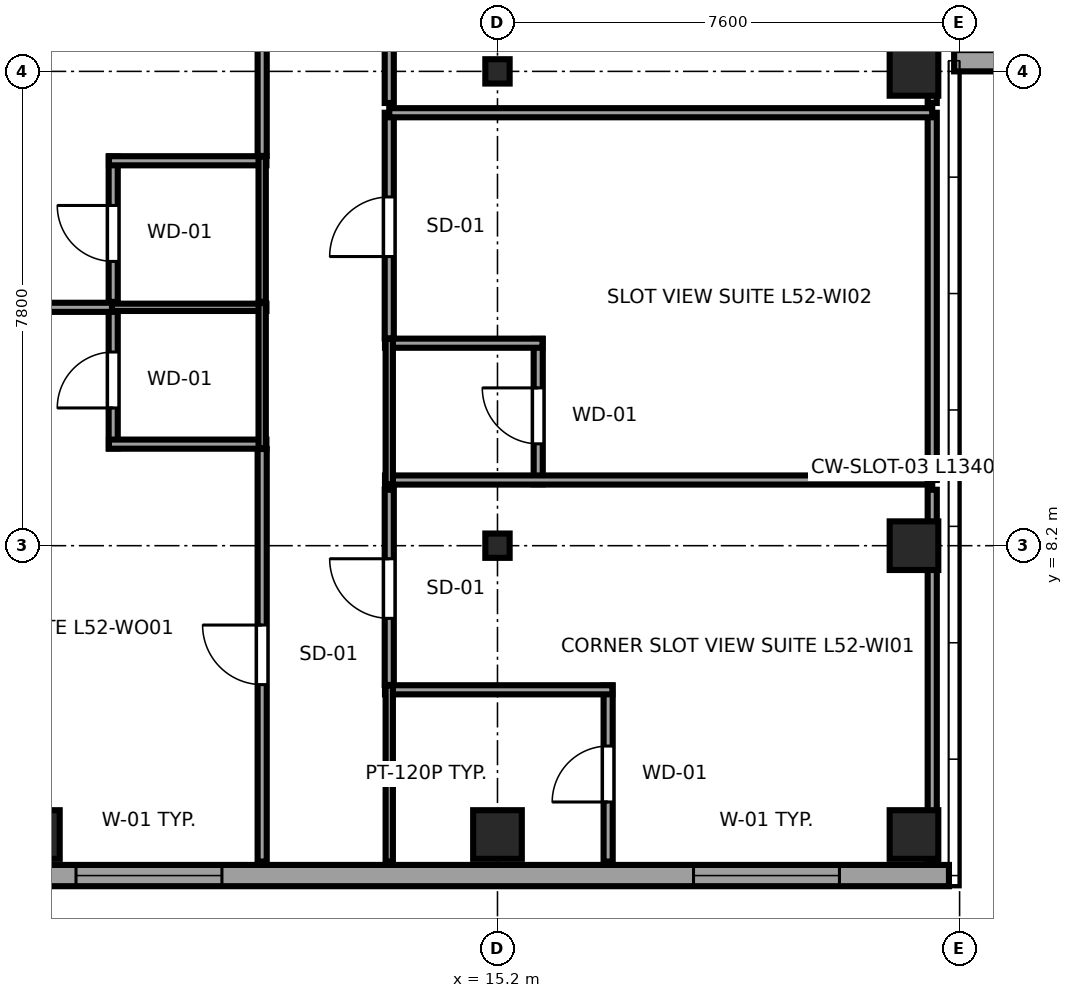
"""IFC4 building model, lengths in metres.
Left out: names, types, materials, properties, quantities, classifications, styles, units other than length and angle.
Written with IfcOpenShell. Run it as: python <this file> out.ifc"""

import sys

from ifc_helpers import new_model, si_unit, direction, frame, frame_2d, origin, origin_2d, place, context, subcontext, project, spatial, rectangle, i_section, extrude, source, transform, mapped, element, fill, save


model = new_model("IFC4")
c1 = context("Model", 3, precision=1e-05, world=origin(), true_north=direction((0.0, 1.0)))
c2 = subcontext(c1, "Body", "Model", "MODEL_VIEW")
j1 = project(units=[si_unit("LENGTHUNIT", "METRE"), si_unit("PLANEANGLEUNIT", "RADIAN")], contexts=[c1])
p1 = place(None, origin())
s1 = spatial("IfcSite", under=j1, at=p1, CompositionType="ELEMENT")
p2 = place(p1, origin())
s2 = spatial("IfcBuilding", under=s1, at=p2, CompositionType="ELEMENT")
p3 = place(p2, frame((0.0, 0.0, 198.2)))
s3 = spatial("IfcBuildingStorey", under=s2, at=p3, CompositionType="ELEMENT", Elevation=198.2)
m1 = source(origin(), c2, "Body", "SweptSolid", [
    extrude(rectangle(XDim=0.8, YDim=0.8, at=origin_2d()), origin(), (0.0, 0.0, 1.0), 3.55),
])
for number, where, z_axis, x_axis in (
    (1, (7.6, 3.45, 0.0), (0.0, 0.0, 1.0), (1.0, 0.0, 0.0)),
    (2, (15.2, 3.45, 0.0), (0.0, 0.0, 1.0), (1.0, 0.0, 0.0)),
):
    element("IfcColumn", number, at=place(p3, frame(where, z_axis=z_axis, x_axis=x_axis)), inside=s3, PredefinedType="COLUMN", context=c2, shape_type="MappedRepresentation", body=[
        mapped(m1, transform((0.0, 0.0, 0.0), x_axis=(1.0, 0.0, 0.0), y_axis=(0.0, 1.0, 0.0), z_axis=(0.0, 0.0, 1.0), scale=1.0)),
    ])
m2 = source(origin(), c2, "Body", "SweptSolid", [
    extrude(i_section(OverallWidth=0.4, OverallDepth=0.4, WebThickness=0.02, FlangeThickness=0.035, at=origin_2d()), origin(), (0.0, 0.0, 1.0), 3.55),
])
for number, where, z_axis, x_axis in (
    (3, (15.2, 8.2, 0.0), (0.0, 0.0, 1.0), (1.0, 0.0, 0.0)),
    (4, (15.2, 16.0, 0.0), (0.0, 0.0, 1.0), (1.0, 0.0, 0.0)),
):
    element("IfcColumn", number, at=place(p3, frame(where, z_axis=z_axis, x_axis=x_axis)), inside=s3, PredefinedType="COLUMN", context=c2, shape_type="MappedRepresentation", body=[
        mapped(m2, transform((0.0, 0.0, 0.0), x_axis=(1.0, 0.0, 0.0), y_axis=(0.0, 1.0, 0.0), z_axis=(0.0, 0.0, 1.0), scale=1.0)),
    ])
for number, where, z_axis, x_axis in (
    (5, (22.05, 3.45, 0.0), (0.0, 0.0, 1.0), (1.0, 0.0, 0.0)),
    (6, (22.05, 8.2, 0.0), (0.0, 0.0, 1.0), (1.0, 0.0, 0.0)),
    (7, (22.05, 16.0, 0.0), (0.0, 0.0, 1.0), (1.0, 0.0, 0.0)),
):
    element("IfcColumn", number, at=place(p3, frame(where, z_axis=z_axis, x_axis=x_axis)), inside=s3, PredefinedType="COLUMN", context=c2, shape_type="MappedRepresentation", body=[
        mapped(m1, transform((0.0, 0.0, 0.0), x_axis=(1.0, 0.0, 0.0), y_axis=(0.0, 1.0, 0.0), z_axis=(0.0, 0.0, 1.0), scale=1.0)),
    ])
p4 = place(p3, frame((7.017, 2.775, 0.0), z_axis=(0.0, 0.0, 1.0), x_axis=(1.0, 0.0, 0.0)))
e8 = element("IfcWall", 8, at=p4, inside=s3, PredefinedType="SOLIDWALL", context=c2, shape_type="SweptSolid", body=[
    extrude(rectangle(XDim=15.608, YDim=0.35, at=frame_2d((7.804, 0.0))), origin(), (0.0, 0.0, 1.0), 3.37),
])
p5 = place(p4, frame((1.251, 0.0, 0.68)))
e9 = element("IfcOpeningElement", 9, at=p5, cuts=e8, PredefinedType="OPENING", context=c2, shape_type="SweptSolid", body=[
    extrude(rectangle(XDim=2.4, YDim=1.9, at=frame_2d((1.2, 0.95))), frame((0.0, 0.185, 0.0), z_axis=(0.0, -1.0, 0.0), x_axis=(1.0, 0.0, 0.0)), (0.0, 0.0, 1.0), 0.37),
])
p6 = place(p4, frame((11.407, 0.0, 0.68)))
e10 = element("IfcOpeningElement", 10, at=p6, cuts=e8, PredefinedType="OPENING", context=c2, shape_type="SweptSolid", body=[
    extrude(rectangle(XDim=2.4, YDim=1.9, at=frame_2d((1.2, 0.95))), frame((0.0, 0.185, 0.0), z_axis=(0.0, -1.0, 0.0), x_axis=(1.0, 0.0, 0.0)), (0.0, 0.0, 1.0), 0.37),
])
p7 = place(p3, frame((22.71, 16.175, 0.0), z_axis=(0.0, 0.0, 1.0), x_axis=(1.0, 0.0, 0.0)))
e11 = element("IfcWall", 11, at=p7, inside=s3, PredefinedType="SOLIDWALL", context=c2, shape_type="SweptSolid", body=[
    extrude(rectangle(XDim=11.58, YDim=0.35, at=frame_2d((5.79, 0.0))), origin(), (0.0, 0.0, 1.0), 2.758),
])
p8 = place(p7, frame((1.995, 0.0, 0.68)))
e12 = element("IfcOpeningElement", 12, at=p8, cuts=e11, PredefinedType="OPENING", context=c2, shape_type="SweptSolid", body=[
    extrude(rectangle(XDim=2.4, YDim=1.9, at=frame_2d((1.2, 0.95))), frame((0.0, 0.185, 0.0), z_axis=(0.0, -1.0, 0.0), x_axis=(1.0, 0.0, 0.0)), (0.0, 0.0, 1.0), 0.37),
])
p9 = place(p7, frame((7.185, 0.0, 0.68)))
e13 = element("IfcOpeningElement", 13, at=p9, cuts=e11, PredefinedType="OPENING", context=c2, shape_type="SweptSolid", body=[
    extrude(rectangle(XDim=2.4, YDim=1.9, at=frame_2d((1.2, 0.95))), frame((0.0, 0.185, 0.0), z_axis=(0.0, -1.0, 0.0), x_axis=(1.0, 0.0, 0.0)), (0.0, 0.0, 1.0), 0.37),
])
p10 = place(p3, frame((8.88, 9.8, 0.0), z_axis=(0.0, 0.0, 1.0), x_axis=(0.0, 1.0, 0.0)))
e14 = element("IfcWall", 14, at=p10, inside=s3, PredefinedType="PARTITIONING", context=c2, shape_type="SweptSolid", body=[
    extrude(rectangle(XDim=2.39, YDim=0.15, at=frame_2d((1.195, 0.0))), origin(), (0.0, 0.0, 1.0), 3.37),
])
p11 = place(p10, frame((0.665, 0.0, 0.0)))
e15 = element("IfcOpeningElement", 15, at=p11, cuts=e14, PredefinedType="OPENING", context=c2, shape_type="SweptSolid", body=[
    extrude(rectangle(XDim=0.92, YDim=2.01, at=frame_2d((0.46, 1.005))), frame((0.0, 0.085, 0.0), z_axis=(0.0, -1.0, 0.0), x_axis=(1.0, 0.0, 0.0)), (0.0, 0.0, 1.0), 0.17),
])
p12 = place(p3, frame((8.81, 9.87, 0.0), z_axis=(0.0, 0.0, 1.0), x_axis=(1.0, 0.0, 0.0)))
e16 = element("IfcWall", 16, at=p12, inside=s3, PredefinedType="PARTITIONING", context=c2, shape_type="SweptSolid", body=[
    extrude(rectangle(XDim=2.59, YDim=0.15, at=frame_2d((1.295, 0.0))), origin(), (0.0, 0.0, 1.0), 3.37),
])
p13 = place(p3, frame((8.81, 12.12, 0.0), z_axis=(0.0, 0.0, 1.0), x_axis=(1.0, 0.0, 0.0)))
e17 = element("IfcWall", 17, at=p13, inside=s3, PredefinedType="PLUMBINGWALL", context=c2, shape_type="SweptSolid", body=[
    extrude(rectangle(XDim=2.59, YDim=0.12, at=frame_2d((1.295, 0.0))), origin(), (0.0, 0.0, 1.0), 3.37),
])
p14 = place(p3, frame((11.33, 9.8, 0.0), z_axis=(0.0, 0.0, 1.0), x_axis=(0.0, 1.0, 0.0)))
e18 = element("IfcWall", 18, at=p14, inside=s3, PredefinedType="PLUMBINGWALL", context=c2, shape_type="SweptSolid", body=[
    extrude(rectangle(XDim=2.39, YDim=0.12, at=frame_2d((1.195, 0.0))), origin(), (0.0, 0.0, 1.0), 3.001),
])
p15 = place(p3, frame((8.88, 12.21, 0.0), z_axis=(0.0, 0.0, 1.0), x_axis=(0.0, 1.0, 0.0)))
e19 = element("IfcWall", 19, at=p15, inside=s3, PredefinedType="PARTITIONING", context=c2, shape_type="SweptSolid", body=[
    extrude(rectangle(XDim=2.39, YDim=0.15, at=frame_2d((1.195, 0.0))), origin(), (0.0, 0.0, 1.0), 3.37),
])
p16 = place(p15, frame((0.665, 0.0, 0.0)))
e20 = element("IfcOpeningElement", 20, at=p16, cuts=e19, PredefinedType="OPENING", context=c2, shape_type="SweptSolid", body=[
    extrude(rectangle(XDim=0.92, YDim=2.01, at=frame_2d((0.46, 1.005))), frame((0.0, 0.085, 0.0), z_axis=(0.0, -1.0, 0.0), x_axis=(1.0, 0.0, 0.0)), (0.0, 0.0, 1.0), 0.17),
])
p17 = place(p3, frame((8.81, 14.53, 0.0), z_axis=(0.0, 0.0, 1.0), x_axis=(1.0, 0.0, 0.0)))
e21 = element("IfcWall", 21, at=p17, inside=s3, PredefinedType="PARTITIONING", context=c2, shape_type="SweptSolid", body=[
    extrude(rectangle(XDim=2.59, YDim=0.15, at=frame_2d((1.295, 0.0))), origin(), (0.0, 0.0, 1.0), 3.37),
])
p18 = place(p3, frame((11.33, 12.21, 0.0), z_axis=(0.0, 0.0, 1.0), x_axis=(0.0, 1.0, 0.0)))
e22 = element("IfcWall", 22, at=p18, inside=s3, PredefinedType="PLUMBINGWALL", context=c2, shape_type="SweptSolid", body=[
    extrude(rectangle(XDim=2.39, YDim=0.12, at=frame_2d((1.195, 0.0))), origin(), (0.0, 0.0, 1.0), 3.001),
])
p19 = place(p3, frame((17.02, 3.005, 0.0), z_axis=(0.0, 0.0, 1.0), x_axis=(0.0, 1.0, 0.0)))
e23 = element("IfcWall", 23, at=p19, inside=s3, PredefinedType="PARTITIONING", context=c2, shape_type="SweptSolid", body=[
    extrude(rectangle(XDim=2.895, YDim=0.15, at=frame_2d((1.448, 0.0))), origin(), (0.0, 0.0, 1.0), 3.37),
])
p20 = place(p19, frame((0.98, 0.0, 0.0)))
e24 = element("IfcOpeningElement", 24, at=p20, cuts=e23, PredefinedType="OPENING", context=c2, shape_type="SweptSolid", body=[
    extrude(rectangle(XDim=0.92, YDim=2.01, at=frame_2d((0.46, 1.005))), frame((0.0, 0.085, 0.0), z_axis=(0.0, -1.0, 0.0), x_axis=(1.0, 0.0, 0.0)), (0.0, 0.0, 1.0), 0.17),
])
p21 = place(p3, frame((13.35, 5.83, 0.0), z_axis=(0.0, 0.0, 1.0), x_axis=(1.0, 0.0, 0.0)))
e25 = element("IfcWall", 25, at=p21, inside=s3, PredefinedType="PARTITIONING", context=c2, shape_type="SweptSolid", body=[
    extrude(rectangle(XDim=3.74, YDim=0.15, at=frame_2d((1.87, 0.0))), origin(), (0.0, 0.0, 1.0), 3.37),
])
p22 = place(p3, frame((13.42, 3.005, 0.0), z_axis=(0.0, 0.0, 1.0), x_axis=(0.0, 1.0, 0.0)))
e26 = element("IfcWall", 26, at=p22, inside=s3, PredefinedType="PLUMBINGWALL", context=c2, shape_type="SweptSolid", body=[
    extrude(rectangle(XDim=2.895, YDim=0.12, at=frame_2d((1.448, 0.0))), origin(), (0.0, 0.0, 1.0), 3.37),
])
p23 = place(p3, frame((15.87, 9.21, 0.0), z_axis=(0.0, 0.0, 1.0), x_axis=(0.0, 1.0, 0.0)))
e27 = element("IfcWall", 27, at=p23, inside=s3, PredefinedType="PARTITIONING", context=c2, shape_type="SweptSolid", body=[
    extrude(rectangle(XDim=2.39, YDim=0.15, at=frame_2d((1.195, 0.0))), origin(), (0.0, 0.0, 1.0), 3.37),
])
p24 = place(p23, frame((0.665, 0.0, 0.0)))
e28 = element("IfcOpeningElement", 28, at=p24, cuts=e27, PredefinedType="OPENING", context=c2, shape_type="SweptSolid", body=[
    extrude(rectangle(XDim=0.92, YDim=2.01, at=frame_2d((0.46, 1.005))), frame((0.0, 0.085, 0.0), z_axis=(0.0, -1.0, 0.0), x_axis=(1.0, 0.0, 0.0)), (0.0, 0.0, 1.0), 0.17),
])
p25 = place(p3, frame((13.35, 9.28, 0.0), z_axis=(0.0, 0.0, 1.0), x_axis=(1.0, 0.0, 0.0)))
e29 = element("IfcWall", 29, at=p25, inside=s3, PredefinedType="PARTITIONING", context=c2, shape_type="SweptSolid", body=[
    extrude(rectangle(XDim=9.0, YDim=0.15, at=frame_2d((4.5, 0.0))), origin(), (0.0, 0.0, 1.0), 3.37),
])
p26 = place(p3, frame((13.35, 11.53, 0.0), z_axis=(0.0, 0.0, 1.0), x_axis=(1.0, 0.0, 0.0)))
e30 = element("IfcWall", 30, at=p26, inside=s3, PredefinedType="PARTITIONING", context=c2, shape_type="SweptSolid", body=[
    extrude(rectangle(XDim=2.59, YDim=0.15, at=frame_2d((1.295, 0.0))), origin(), (0.0, 0.0, 1.0), 3.37),
])
p27 = place(p3, frame((13.42, 9.21, 0.0), z_axis=(0.0, 0.0, 1.0), x_axis=(0.0, 1.0, 0.0)))
e31 = element("IfcWall", 31, at=p27, inside=s3, PredefinedType="PLUMBINGWALL", context=c2, shape_type="SweptSolid", body=[
    extrude(rectangle(XDim=2.39, YDim=0.12, at=frame_2d((1.195, 0.0))), origin(), (0.0, 0.0, 1.0), 3.37),
])
p28 = place(p3, frame((11.33, 3.005, 0.0), z_axis=(0.0, 0.0, 1.0), x_axis=(0.0, 1.0, 0.0)))
e32 = element("IfcWall", 32, at=p28, inside=s3, PredefinedType="PARTITIONING", context=c2, shape_type="SweptSolid", body=[
    extrude(rectangle(XDim=6.785, YDim=0.15, at=frame_2d((3.393, 0.0))), origin(), (0.0, 0.0, 1.0), 3.001),
])
p29 = place(p28, frame((2.91, 0.0, 0.0)))
e33 = element("IfcOpeningElement", 33, at=p29, cuts=e32, PredefinedType="OPENING", context=c2, shape_type="SweptSolid", body=[
    extrude(rectangle(XDim=0.98, YDim=2.12, at=frame_2d((0.49, 1.06))), frame((0.0, 0.085, 0.0), z_axis=(0.0, -1.0, 0.0), x_axis=(1.0, 0.0, 0.0)), (0.0, 0.0, 1.0), 0.17),
])
p30 = place(p3, frame((2.9, 12.12, 0.0), z_axis=(0.0, 0.0, 1.0), x_axis=(1.0, 0.0, 0.0)))
e34 = element("IfcWall", 34, at=p30, inside=s3, PredefinedType="PARTITIONING", context=c2, shape_type="SweptSolid", body=[
    extrude(rectangle(XDim=5.96, YDim=0.15, at=frame_2d((2.98, 0.0))), origin(), (0.0, 0.0, 1.0), 3.37),
])
p31 = place(p3, frame((11.33, 14.61, 0.0), z_axis=(0.0, 0.0, 1.0), x_axis=(0.0, 1.0, 0.0)))
e35 = element("IfcWall", 35, at=p31, inside=s3, PredefinedType="PARTITIONING", context=c2, shape_type="SweptSolid", body=[
    extrude(rectangle(XDim=6.81, YDim=0.15, at=frame_2d((3.405, 0.0))), origin(), (0.0, 0.0, 1.0), 3.001),
])
p32 = place(p31, frame((2.895, 0.0, 0.0)))
e36 = element("IfcOpeningElement", 36, at=p32, cuts=e35, PredefinedType="OPENING", context=c2, shape_type="SweptSolid", body=[
    extrude(rectangle(XDim=0.98, YDim=2.12, at=frame_2d((0.49, 1.06))), frame((0.0, 0.085, 0.0), z_axis=(0.0, -1.0, 0.0), x_axis=(1.0, 0.0, 0.0)), (0.0, 0.0, 1.0), 0.17),
])
p33 = place(p3, frame((13.42, 5.91, 0.0), z_axis=(0.0, 0.0, 1.0), x_axis=(0.0, 1.0, 0.0)))
e37 = element("IfcWall", 37, at=p33, inside=s3, PredefinedType="PARTITIONING", context=c2, shape_type="SweptSolid", body=[
    extrude(rectangle(XDim=3.21, YDim=0.15, at=frame_2d((1.605, 0.0))), origin(), (0.0, 0.0, 1.0), 3.37),
])
p34 = place(p33, frame((1.095, 0.0, 0.0)))
e38 = element("IfcOpeningElement", 38, at=p34, cuts=e37, PredefinedType="OPENING", context=c2, shape_type="SweptSolid", body=[
    extrude(rectangle(XDim=0.98, YDim=2.12, at=frame_2d((0.49, 1.06))), frame((0.0, 0.085, 0.0), z_axis=(0.0, -1.0, 0.0), x_axis=(1.0, 0.0, 0.0)), (0.0, 0.0, 1.0), 0.17),
])
p35 = place(p3, frame((22.35, 3.005, 0.0), z_axis=(0.0, 0.0, 1.0), x_axis=(0.0, 1.0, 0.0)))
e39 = element("IfcWall", 39, at=p35, inside=s3, PredefinedType="PARTITIONING", context=c2, shape_type="SweptSolid", body=[
    extrude(rectangle(XDim=6.115, YDim=0.15, at=frame_2d((3.058, 0.0))), origin(), (0.0, 0.0, 1.0), 3.37),
])
p36 = place(p3, frame((13.42, 11.61, 0.0), z_axis=(0.0, 0.0, 1.0), x_axis=(0.0, 1.0, 0.0)))
e40 = element("IfcWall", 40, at=p36, inside=s3, PredefinedType="PARTITIONING", context=c2, shape_type="SweptSolid", body=[
    extrude(rectangle(XDim=3.71, YDim=0.15, at=frame_2d((1.855, 0.0))), origin(), (0.0, 0.0, 1.0), 3.37),
])
p37 = place(p36, frame((1.345, 0.0, 0.0)))
e41 = element("IfcOpeningElement", 41, at=p37, cuts=e40, PredefinedType="OPENING", context=c2, shape_type="SweptSolid", body=[
    extrude(rectangle(XDim=0.98, YDim=2.12, at=frame_2d((0.49, 1.06))), frame((0.0, 0.085, 0.0), z_axis=(0.0, -1.0, 0.0), x_axis=(1.0, 0.0, 0.0)), (0.0, 0.0, 1.0), 0.17),
])
p38 = place(p3, frame((22.35, 9.28, 0.0), z_axis=(0.0, 0.0, 1.0), x_axis=(0.0, 1.0, 0.0)))
e42 = element("IfcWall", 42, at=p38, inside=s3, PredefinedType="PARTITIONING", context=c2, shape_type="SweptSolid", body=[
    extrude(rectangle(XDim=6.04, YDim=0.15, at=frame_2d((3.02, 0.0))), origin(), (0.0, 0.0, 1.0), 3.37),
])
p39 = place(p3, frame((13.42, 15.32, 0.0), z_axis=(0.0, 0.0, 1.0), x_axis=(1.0, 0.0, 0.0)))
e43 = element("IfcWall", 43, at=p39, inside=s3, PredefinedType="PARTITIONING", context=c2, shape_type="SweptSolid", body=[
    extrude(rectangle(XDim=8.93, YDim=0.15, at=frame_2d((4.465, 0.0))), origin(), (0.0, 0.0, 1.0), 3.37),
])
p40 = place(p3, frame((13.42, 15.48, 0.0), z_axis=(0.0, 0.0, 1.0), x_axis=(0.0, 1.0, 0.0)))
e44 = element("IfcWall", 44, at=p40, inside=s3, PredefinedType="PARTITIONING", context=c2, shape_type="SweptSolid", body=[
    extrude(rectangle(XDim=3.61, YDim=0.15, at=frame_2d((1.805, 0.0))), origin(), (0.0, 0.0, 1.0), 3.37),
])
p41 = place(p40, frame((1.295, 0.0, 0.0)))
e45 = element("IfcOpeningElement", 45, at=p41, cuts=e44, PredefinedType="OPENING", context=c2, shape_type="SweptSolid", body=[
    extrude(rectangle(XDim=0.98, YDim=2.12, at=frame_2d((0.49, 1.06))), frame((0.0, 0.085, 0.0), z_axis=(0.0, -1.0, 0.0), x_axis=(1.0, 0.0, 0.0)), (0.0, 0.0, 1.0), 0.17),
])
p42 = place(p3, frame((22.35, 15.48, 0.0), z_axis=(0.0, 0.0, 1.0), x_axis=(0.0, 1.0, 0.0)))
e46 = element("IfcWall", 46, at=p42, inside=s3, PredefinedType="PARTITIONING", context=c2, shape_type="SweptSolid", body=[
    extrude(rectangle(XDim=5.94, YDim=0.15, at=frame_2d((2.97, 0.0))), origin(), (0.0, 0.0, 1.0), 3.37),
])
m3 = source(origin(), c2, "Body", "SweptSolid", [
    extrude(rectangle(XDim=2.4, YDim=1.9, at=frame_2d((1.2, 0.95))), frame((0.0, 0.09, 0.0), z_axis=(0.0, -1.0, 0.0), x_axis=(1.0, 0.0, 0.0)), (0.0, 0.0, 1.0), 0.06),
])
p43 = place(p5, origin())
e47 = element("IfcWindow", 47, at=p43, inside=s3, PartitioningType="TRIPLE_PANEL_HORIZONTAL", PredefinedType="WINDOW", context=c2, shape_type="MappedRepresentation", body=[
    mapped(m3, transform((0.0, 0.0, 0.0), x_axis=(1.0, 0.0, 0.0), y_axis=(0.0, 1.0, 0.0), z_axis=(0.0, 0.0, 1.0), scale=1.0)),
])
fill(e9, e47)
p44 = place(p6, origin())
e48 = element("IfcWindow", 48, at=p44, inside=s3, PartitioningType="TRIPLE_PANEL_HORIZONTAL", PredefinedType="WINDOW", context=c2, shape_type="MappedRepresentation", body=[
    mapped(m3, transform((0.0, 0.0, 0.0), x_axis=(1.0, 0.0, 0.0), y_axis=(0.0, 1.0, 0.0), z_axis=(0.0, 0.0, 1.0), scale=1.0)),
])
fill(e10, e48)
m4 = source(origin(), c2, "Body", "SweptSolid", [
    extrude(rectangle(XDim=0.92, YDim=2.01, at=frame_2d((0.46, 1.005))), frame((0.0, 0.025, 0.0), z_axis=(0.0, -1.0, 0.0), x_axis=(1.0, 0.0, 0.0)), (0.0, 0.0, 1.0), 0.05),
])
p45 = place(p11, origin())
e49 = element("IfcDoor", 49, at=p45, inside=s3, OperationType="SINGLE_SWING_LEFT", PredefinedType="DOOR", context=c2, shape_type="MappedRepresentation", body=[
    mapped(m4, transform((0.0, 0.0, 0.0), x_axis=(1.0, 0.0, 0.0), y_axis=(0.0, 1.0, 0.0), z_axis=(0.0, 0.0, 1.0), scale=1.0)),
])
fill(e15, e49)
p46 = place(p16, origin())
e50 = element("IfcDoor", 50, at=p46, inside=s3, OperationType="SINGLE_SWING_RIGHT", PredefinedType="DOOR", context=c2, shape_type="MappedRepresentation", body=[
    mapped(m4, transform((0.0, 0.0, 0.0), x_axis=(1.0, 0.0, 0.0), y_axis=(0.0, 1.0, 0.0), z_axis=(0.0, 0.0, 1.0), scale=1.0)),
])
fill(e20, e50)
p47 = place(p20, origin())
e51 = element("IfcDoor", 51, at=p47, inside=s3, OperationType="SINGLE_SWING_LEFT", PredefinedType="DOOR", context=c2, shape_type="MappedRepresentation", body=[
    mapped(m4, transform((0.0, 0.0, 0.0), x_axis=(1.0, 0.0, 0.0), y_axis=(0.0, 1.0, 0.0), z_axis=(0.0, 0.0, 1.0), scale=1.0)),
])
fill(e24, e51)
p48 = place(p24, origin())
e52 = element("IfcDoor", 52, at=p48, inside=s3, OperationType="SINGLE_SWING_RIGHT", PredefinedType="DOOR", context=c2, shape_type="MappedRepresentation", body=[
    mapped(m4, transform((0.0, 0.0, 0.0), x_axis=(1.0, 0.0, 0.0), y_axis=(0.0, 1.0, 0.0), z_axis=(0.0, 0.0, 1.0), scale=1.0)),
])
fill(e28, e52)
m5 = source(origin(), c2, "Body", "SweptSolid", [
    extrude(rectangle(XDim=0.98, YDim=2.12, at=frame_2d((0.49, 1.06))), frame((0.0, 0.025, 0.0), z_axis=(0.0, -1.0, 0.0), x_axis=(1.0, 0.0, 0.0)), (0.0, 0.0, 1.0), 0.05),
])
p49 = place(p29, origin())
e53 = element("IfcDoor", 53, at=p49, inside=s3, OperationType="SINGLE_SWING_RIGHT", PredefinedType="DOOR", context=c2, shape_type="MappedRepresentation", body=[
    mapped(m5, transform((0.0, 0.0, 0.0), x_axis=(1.0, 0.0, 0.0), y_axis=(0.0, 1.0, 0.0), z_axis=(0.0, 0.0, 1.0), scale=1.0)),
])
fill(e33, e53)
p50 = place(p34, origin())
e54 = element("IfcDoor", 54, at=p50, inside=s3, OperationType="SINGLE_SWING_RIGHT", PredefinedType="DOOR", context=c2, shape_type="MappedRepresentation", body=[
    mapped(m5, transform((0.0, 0.0, 0.0), x_axis=(1.0, 0.0, 0.0), y_axis=(0.0, 1.0, 0.0), z_axis=(0.0, 0.0, 1.0), scale=1.0)),
])
fill(e38, e54)
p51 = place(p37, origin())
e55 = element("IfcDoor", 55, at=p51, inside=s3, OperationType="SINGLE_SWING_LEFT", PredefinedType="DOOR", context=c2, shape_type="MappedRepresentation", body=[
    mapped(m5, transform((0.0, 0.0, 0.0), x_axis=(1.0, 0.0, 0.0), y_axis=(0.0, 1.0, 0.0), z_axis=(0.0, 0.0, 1.0), scale=1.0)),
])
fill(e41, e55)
save(model, sys.argv[1])
